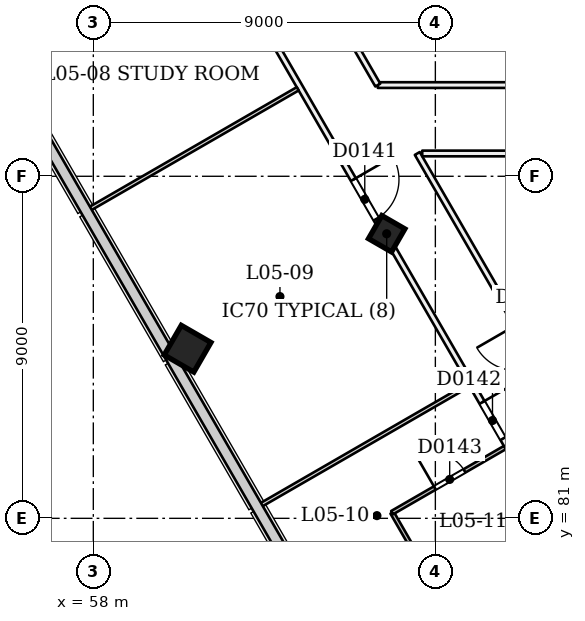
"""IFC4 building model, lengths in metres.
Left out: names, types, materials, properties, quantities, classifications, styles, units other than length and angle.
Written with IfcOpenShell. Run it as: python <this file> out.ifc"""

import sys

from ifc_helpers import new_model, si_unit, direction, frame, frame_2d, origin, origin_2d, place, context, subcontext, project, spatial, rectangle, extrude, element, fill, save


model = new_model("IFC4")
c1 = context("Model", 3, precision=1e-05, world=origin(), true_north=direction((0.0, 1.0)))
c2 = subcontext(c1, "Body", "Model", "MODEL_VIEW")
j1 = project(units=[si_unit("LENGTHUNIT", "METRE"), si_unit("PLANEANGLEUNIT", "RADIAN")], contexts=[c1])
p1 = place(None, origin())
s1 = spatial("IfcSite", under=j1, at=p1, CompositionType="ELEMENT")
p2 = place(p1, origin())
s2 = spatial("IfcBuilding", under=s1, at=p2, CompositionType="ELEMENT")
p3 = place(p2, frame((0.0, 0.0, 27.0)))
s3 = spatial("IfcBuildingStorey", under=s2, at=p3, CompositionType="ELEMENT", Elevation=27.0)
p4 = place(p3, frame((65.692, 88.44, -0.021), z_axis=(0.02222134892, 0.038480872521, 0.999012229206), x_axis=(-0.865642072591, -0.499182214127, 0.038482713782)))
e1 = element("IfcColumn", 1, at=p4, inside=s3, PredefinedType="COLUMN", context=c2, shape_type="SweptSolid", body=[
    extrude(rectangle(XDim=0.7, YDim=0.7, at=origin_2d()), origin(), (0.0, 0.0, 1.0), 3.604),
])
p5 = place(p3, frame((60.453, 85.415, -0.027), z_axis=(0.022153634206, 0.038480930364, 0.999013730882), x_axis=(-0.864982406193, -0.500326661322, 0.038453464699)))
e2 = element("IfcColumn", 2, at=p5, inside=s3, PredefinedType="COLUMN", context=c2, shape_type="SweptSolid", body=[
    extrude(rectangle(XDim=0.9, YDim=0.9, at=origin_2d()), origin(), (0.0, 0.0, 1.0), 3.604),
])
p6 = place(p3, frame((70.125, 92.4, 0.0), z_axis=(0.0, 0.0, 1.0), x_axis=(-1.0, 0.0, 0.0)))
e3 = element("IfcWall", 3, at=p6, inside=s3, PredefinedType="PARTITIONING", context=c2, shape_type="SweptSolid", body=[
    extrude(rectangle(XDim=4.639, YDim=0.15, at=frame_2d((2.32, 0.0))), origin(), (0.0, 0.0, 1.0), 3.1),
])
p7 = place(p3, frame((65.486, 92.4, 0.0), z_axis=(0.0, 0.0, 1.0), x_axis=(-0.499988785058, 0.866031878637, 0.0)))
e4 = element("IfcWall", 4, at=p7, inside=s3, PredefinedType="PARTITIONING", context=c2, shape_type="SweptSolid", body=[
    extrude(rectangle(XDim=4.549, YDim=0.15, at=frame_2d((2.275, 0.0))), origin(), (0.0, 0.0, 1.0), 3.1),
])
p8 = place(p3, frame((61.193, 96.236, 0.0), z_axis=(0.0, 0.0, 1.0), x_axis=(0.49999953585, -0.866025671762, 0.0)))
e5 = element("IfcWall", 5, at=p8, inside=s3, PredefinedType="PARTITIONING", context=c2, shape_type="SweptSolid", body=[
    extrude(rectangle(XDim=45.0, YDim=0.15, at=frame_2d((22.5, 0.0))), origin(), (0.0, 0.0, 1.0), 2.7),
])
p9 = place(p8, frame((1.75, 0.0, 0.0)))
e6 = element("IfcOpeningElement", 6, at=p9, cuts=e5, PredefinedType="OPENING", context=c2, shape_type="SweptSolid", body=[
    extrude(rectangle(XDim=1.0, YDim=2.1, at=frame_2d((0.5, 1.05))), frame((0.0, 0.085, 0.0), z_axis=(0.0, -1.0, 0.0), x_axis=(1.0, 0.0, 0.0)), (0.0, 0.0, 1.0), 0.171),
])
p10 = place(p8, frame((7.3, 0.0, 0.0)))
e7 = element("IfcOpeningElement", 7, at=p10, cuts=e5, PredefinedType="OPENING", context=c2, shape_type="SweptSolid", body=[
    extrude(rectangle(XDim=1.2, YDim=2.1, at=frame_2d((0.6, 1.05))), frame((0.0, 0.085, 0.0), z_axis=(0.0, -1.0, 0.0), x_axis=(1.0, 0.0, 0.0)), (0.0, 0.0, 1.0), 0.171),
])
p11 = place(p8, frame((14.071, 0.0, 0.0)))
e8 = element("IfcOpeningElement", 8, at=p11, cuts=e5, PredefinedType="OPENING", context=c2, shape_type="SweptSolid", body=[
    extrude(rectangle(XDim=1.1, YDim=2.1, at=frame_2d((0.55, 1.05))), frame((0.0, 0.085, 0.0), z_axis=(0.0, -1.0, 0.0), x_axis=(1.0, 0.0, 0.0)), (0.0, 0.0, 1.0), 0.171),
])
p12 = place(p8, frame((20.78, 0.0, 0.0)))
e9 = element("IfcOpeningElement", 9, at=p12, cuts=e5, PredefinedType="OPENING", context=c2, shape_type="SweptSolid", body=[
    extrude(rectangle(XDim=1.0, YDim=2.1, at=frame_2d((0.5, 1.05))), frame((0.0, 0.085, 0.0), z_axis=(0.0, -1.0, 0.0), x_axis=(1.0, 0.0, 0.0)), (0.0, 0.0, 1.0), 0.171),
])
p13 = place(p8, frame((23.105, 0.0, 0.0)))
e10 = element("IfcOpeningElement", 10, at=p13, cuts=e5, PredefinedType="OPENING", context=c2, shape_type="SweptSolid", body=[
    extrude(rectangle(XDim=1.0, YDim=2.1, at=frame_2d((0.5, 1.05))), frame((0.0, 0.085, 0.0), z_axis=(0.0, -1.0, 0.0), x_axis=(1.0, 0.0, 0.0)), (0.0, 0.0, 1.0), 0.171),
])
p14 = place(p8, frame((28.75, 0.0, 0.0)))
e11 = element("IfcOpeningElement", 11, at=p14, cuts=e5, PredefinedType="OPENING", context=c2, shape_type="SweptSolid", body=[
    extrude(rectangle(XDim=1.0, YDim=2.1, at=frame_2d((0.5, 1.05))), frame((0.0, 0.085, 0.0), z_axis=(0.0, -1.0, 0.0), x_axis=(1.0, 0.0, 0.0)), (0.0, 0.0, 1.0), 0.171),
])
p15 = place(p8, frame((34.3, 0.0, 0.0)))
e12 = element("IfcOpeningElement", 12, at=p15, cuts=e5, PredefinedType="OPENING", context=c2, shape_type="SweptSolid", body=[
    extrude(rectangle(XDim=1.2, YDim=2.1, at=frame_2d((0.6, 1.05))), frame((0.0, 0.085, 0.0), z_axis=(0.0, -1.0, 0.0), x_axis=(1.0, 0.0, 0.0)), (0.0, 0.0, 1.0), 0.171),
])
p16 = place(p8, frame((43.28, 0.0, 0.0)))
e13 = element("IfcOpeningElement", 13, at=p16, cuts=e5, PredefinedType="OPENING", context=c2, shape_type="SweptSolid", body=[
    extrude(rectangle(XDim=1.0, YDim=2.1, at=frame_2d((0.5, 1.05))), frame((0.0, 0.085, 0.0), z_axis=(0.0, -1.0, 0.0), x_axis=(1.0, 0.0, 0.0)), (0.0, 0.0, 1.0), 0.171),
])
p17 = place(p3, frame((84.792, 58.96, 0.0), z_axis=(0.0, 0.0, 1.0), x_axis=(-0.499995675587, 0.866027900471, 0.0)))
e14 = element("IfcWall", 14, at=p17, inside=s3, PredefinedType="PARTITIONING", context=c2, shape_type="SweptSolid", body=[
    extrude(rectangle(XDim=36.534, YDim=0.15, at=frame_2d((18.267, 0.0))), origin(), (0.0, 0.0, 1.0), 3.1),
])
p18 = place(p17, frame((4.466, 0.0, 0.0)))
e15 = element("IfcOpeningElement", 15, at=p18, cuts=e14, PredefinedType="OPENING", context=c2, shape_type="SweptSolid", body=[
    extrude(rectangle(XDim=1.2, YDim=2.1, at=frame_2d((0.6, 1.05))), frame((0.0, 0.085, 0.0), z_axis=(0.0, -1.0, 0.0), x_axis=(1.0, 0.0, 0.0)), (0.0, 0.0, 1.0), 0.171),
])
p19 = place(p17, frame((16.337, 0.0, 0.0)))
e16 = element("IfcOpeningElement", 16, at=p19, cuts=e14, PredefinedType="OPENING", context=c2, shape_type="SweptSolid", body=[
    extrude(rectangle(XDim=1.2, YDim=2.1, at=frame_2d((0.6, 1.05))), frame((0.0, 0.085, 0.0), z_axis=(0.0, -1.0, 0.0), x_axis=(1.0, 0.0, 0.0)), (0.0, 0.0, 1.0), 0.171),
])
p20 = place(p17, frame((30.124, 0.0, 0.0)))
e17 = element("IfcOpeningElement", 17, at=p20, cuts=e14, PredefinedType="OPENING", context=c2, shape_type="SweptSolid", body=[
    extrude(rectangle(XDim=1.2, YDim=2.1, at=frame_2d((0.6, 1.05))), frame((0.0, 0.085, 0.0), z_axis=(0.0, -1.0, 0.0), x_axis=(1.0, 0.0, 0.0)), (0.0, 0.0, 1.0), 0.171),
])
p21 = place(p17, frame((24.546, 0.0, 0.0)))
e18 = element("IfcOpeningElement", 18, at=p21, cuts=e14, PredefinedType="OPENING", context=c2, shape_type="SweptSolid", body=[
    extrude(rectangle(XDim=1.2, YDim=2.1, at=frame_2d((0.6, 1.05))), frame((0.0, 0.085, 0.0), z_axis=(0.0, -1.0, 0.0), x_axis=(1.0, 0.0, 0.0)), (0.0, 0.0, 1.0), 0.171),
])
p22 = place(p3, frame((66.655, 90.6, 0.0), z_axis=(0.0, 0.0, 1.0), x_axis=(0.999999997968, -6.3746036e-05, 0.0)))
e19 = element("IfcWall", 19, at=p22, inside=s3, PredefinedType="PARTITIONING", context=c2, shape_type="SweptSolid", body=[
    extrude(rectangle(XDim=15.32, YDim=0.15, at=frame_2d((7.66, 0.0))), origin(), (0.0, 0.0, 1.0), 3.1),
])
p23 = place(p3, frame((55.633, 93.025, 0.0), z_axis=(0.0, 0.0, 1.0), x_axis=(0.866025401434, 0.500000004071, 0.0)))
e20 = element("IfcWall", 20, at=p23, inside=s3, PredefinedType="PARTITIONING", context=c2, shape_type="SweptSolid", body=[
    extrude(rectangle(XDim=6.345, YDim=0.15, at=frame_2d((3.173, 0.0))), origin(), (0.0, 0.0, 1.0), 2.6),
])
for number, where, z_axis, x_axis in (
    (21, (57.883, 89.128, 0.0), (0.0, 0.0, 1.0), (0.866, 0.5, 0.0)),
    (22, (62.383, 81.334, 0.0), (0.0, 0.0, 1.0), (0.866, 0.5, 0.0)),
):
    element("IfcWall", number, at=place(p3, frame(where, z_axis=z_axis, x_axis=x_axis)), inside=s3, PredefinedType="PARTITIONING", context=c2, shape_type="SweptSolid", body=[
        extrude(rectangle(XDim=6.345, YDim=0.1, at=frame_2d((3.173, 0.0))), origin(), (0.0, 0.0, 1.0), 2.6),
    ])
p24 = place(p3, frame((67.124, 78.962, 0.0), z_axis=(0.0, 0.0, 1.0), x_axis=(-0.50001820224, 0.866014894461, 0.0)))
e23 = element("IfcWall", 23, at=p24, inside=s3, PredefinedType="PARTITIONING", context=c2, shape_type="SweptSolid", body=[
    extrude(rectangle(XDim=2.525, YDim=0.1, at=frame_2d((1.262, 0.0))), origin(), (0.0, 0.0, 1.0), 2.7),
])
p25 = place(p3, frame((65.862, 81.149, 0.0), z_axis=(0.0, 0.0, 1.0), x_axis=(0.866001587311, 0.500041249073, 0.0)))
e24 = element("IfcWall", 24, at=p25, inside=s3, PredefinedType="PARTITIONING", context=c2, shape_type="SweptSolid", body=[
    extrude(rectangle(XDim=3.425, YDim=0.1, at=frame_2d((1.712, 0.0))), origin(), (0.0, 0.0, 1.0), 3.1),
])
p26 = place(p25, frame((1.3, 0.0, 0.0)))
e25 = element("IfcOpeningElement", 25, at=p26, cuts=e24, PredefinedType="OPENING", context=c2, shape_type="SweptSolid", body=[
    extrude(rectangle(XDim=0.9, YDim=2.1, at=frame_2d((0.45, 1.05))), frame((0.0, 0.061, 0.0), z_axis=(0.0, -1.0, 0.0), x_axis=(1.0, 0.0, 0.0)), (0.0, 0.0, 1.0), 0.121),
])
p27 = place(p3, frame((67.144, 78.887, 0.0), z_axis=(0.0, 0.0, 1.0), x_axis=(0.866032163869, 0.499988291006, 0.0)))
e26 = element("IfcWall", 26, at=p27, inside=s3, PredefinedType="PARTITIONING", context=c2, shape_type="SweptSolid", body=[
    extrude(rectangle(XDim=3.445, YDim=0.1, at=frame_2d((1.722, 0.0))), origin(), (0.0, 0.0, 1.0), 2.7),
])
p28 = place(p10, origin())
e27 = element("IfcDoor", 27, at=p28, inside=s3, OperationType="SINGLE_SWING_LEFT", PredefinedType="NOTDEFINED", context=c2, shape_type="SweptSolid", body=[
    extrude(rectangle(XDim=1.2, YDim=2.1, at=frame_2d((0.6, 1.05))), frame((0.0, 0.025, 0.0), z_axis=(0.0, -1.0, 0.0), x_axis=(1.0, 0.0, 0.0)), (0.0, 0.0, 1.0), 0.05),
])
fill(e7, e27)
p29 = place(p11, origin())
e28 = element("IfcDoor", 28, at=p29, inside=s3, OperationType="SINGLE_SWING_LEFT", PredefinedType="NOTDEFINED", context=c2, shape_type="SweptSolid", body=[
    extrude(rectangle(XDim=1.1, YDim=2.1, at=frame_2d((0.55, 1.05))), frame((0.0, 0.025, 0.0), z_axis=(0.0, -1.0, 0.0), x_axis=(1.0, 0.0, 0.0)), (0.0, 0.0, 1.0), 0.05),
])
fill(e8, e28)
p30 = place(p26, origin())
e29 = element("IfcDoor", 29, at=p30, inside=s3, OperationType="SINGLE_SWING_LEFT", PredefinedType="NOTDEFINED", context=c2, shape_type="SweptSolid", body=[
    extrude(rectangle(XDim=0.9, YDim=2.1, at=frame_2d((0.45, 1.05))), frame((0.0, 0.025, 0.0), z_axis=(0.0, -1.0, 0.0), x_axis=(1.0, 0.0, 0.0)), (0.0, 0.0, 1.0), 0.05),
])
fill(e25, e29)
save(model, sys.argv[1])
